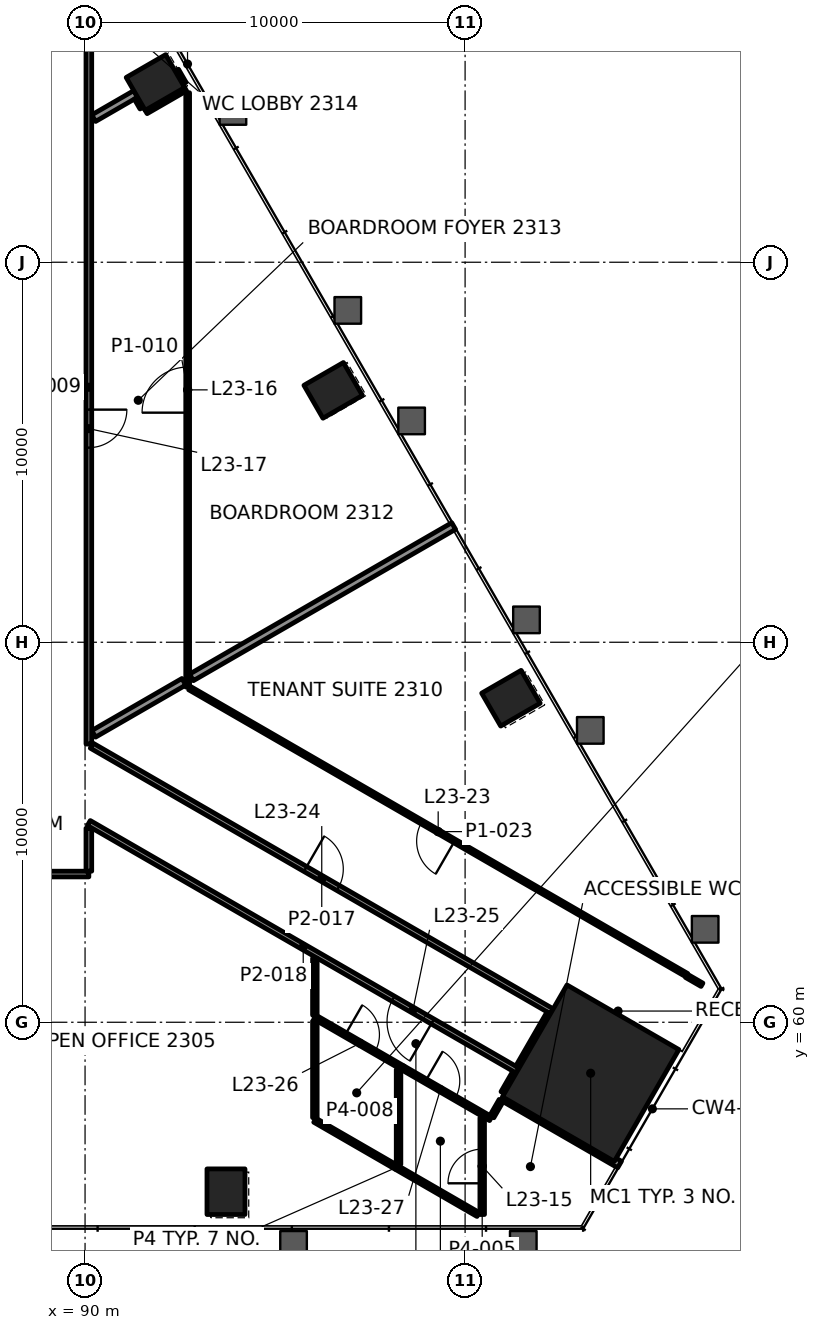
"""IFC4 building model, lengths in metres.
Left out: names, types, materials, properties, quantities, classifications, styles, units other than length and angle.
Written with IfcOpenShell. Run it as: python <this file> out.ifc"""

import sys

from ifc_helpers import new_model, si_unit, direction, frame, frame_2d, origin, origin_2d, place, context, subcontext, project, spatial, rectangle, extrude, element, fill, save


model = new_model("IFC4")
c1 = context("Model", 3, precision=1e-05, world=origin(), true_north=direction((0.0, 1.0)))
c2 = subcontext(c1, "Body", "Model", "MODEL_VIEW")
j1 = project(units=[si_unit("LENGTHUNIT", "METRE"), si_unit("PLANEANGLEUNIT", "RADIAN")], contexts=[c1])
p1 = place(None, origin())
s1 = spatial("IfcSite", under=j1, at=p1, CompositionType="ELEMENT")
p2 = place(p1, origin())
s2 = spatial("IfcBuilding", under=s1, at=p2, CompositionType="ELEMENT")
p3 = place(p2, frame((0.0, 0.0, 103.0)))
s3 = spatial("IfcBuildingStorey", under=s2, at=p3, CompositionType="ELEMENT", Elevation=103.0)
p4 = place(p3, frame((103.304, 58.659, 0.0), z_axis=(0.0, 0.0, 1.0), x_axis=(0.5, 0.866025403784, 0.0)))
e1 = element("IfcColumn", 1, at=p4, inside=s3, PredefinedType="COLUMN", context=c2, shape_type="SweptSolid", body=[
    extrude(rectangle(XDim=3.4, YDim=3.4, at=origin_2d()), origin(), (0.0, 0.0, 1.0), 4.2),
])
for number, where, z_axis, x_axis in (
    (2, (93.708, 55.541, -0.0), (0.0, 0.0, 1.0), (1.0, 0.0, 0.0)),
    (3, (101.206, 68.528, -0.0), (0.0, 0.0, 1.0), (-0.5, 0.866, 0.0)),
    (4, (96.529, 76.628, -0.0), (0.0, 0.0, 1.0), (-0.5, 0.866, 0.0)),
    (5, (91.852, 84.729, -0.0), (0.0, 0.0, 1.0), (-0.5, 0.866, 0.0)),
):
    element("IfcColumn", number, at=place(p3, frame(where, z_axis=z_axis, x_axis=x_axis)), inside=s3, PredefinedType="COLUMN", context=c2, shape_type="SweptSolid", body=[
        extrude(rectangle(XDim=1.0, YDim=1.2, at=origin_2d()), origin(), (0.0, 0.0, 1.0), 4.2),
    ])
p5 = place(p3, frame((90.099, 63.9, 0.0), z_axis=(0.0, 0.0, 1.0), x_axis=(-1.0, 0.0, 0.0)))
e6 = element("IfcWall", 6, at=p5, inside=s3, PredefinedType="PARTITIONING", context=c2, shape_type="SweptSolid", body=[
    extrude(rectangle(XDim=30.199, YDim=0.15, at=frame_2d((15.099, 0.0))), origin(), (0.0, 0.0, 1.0), 3.4),
])
p6 = place(p5, frame((5.882, 0.0, 0.0)))
e7 = element("IfcOpeningElement", 7, at=p6, cuts=e6, PredefinedType="OPENING", context=c2, shape_type="SweptSolid", body=[
    extrude(rectangle(XDim=1.2, YDim=2.1, at=frame_2d((0.6, 1.05))), frame((0.0, 0.085, 0.0), z_axis=(0.0, -1.0, 0.0), x_axis=(1.0, 0.0, 0.0)), (0.0, 0.0, 1.0), 0.17),
])
p7 = place(p5, frame((20.346, 0.0, 0.0)))
e8 = element("IfcOpeningElement", 8, at=p7, cuts=e6, PredefinedType="OPENING", context=c2, shape_type="SweptSolid", body=[
    extrude(rectangle(XDim=1.2, YDim=2.1, at=frame_2d((0.6, 1.05))), frame((0.0, 0.085, 0.0), z_axis=(0.0, -1.0, 0.0), x_axis=(1.0, 0.0, 0.0)), (0.0, 0.0, 1.0), 0.17),
])
p8 = place(p3, frame((90.227, 67.59, 0.0), z_axis=(0.0, 0.0, 1.0), x_axis=(0.866003105128, 0.500038620418, 0.0)))
e9 = element("IfcWall", 9, at=p8, inside=s3, PredefinedType="PARTITIONING", context=c2, shape_type="SweptSolid", body=[
    extrude(rectangle(XDim=2.74, YDim=0.2, at=frame_2d((1.37, 0.0))), origin(), (0.0, 0.0, 1.0), 3.4),
])
p9 = place(p3, frame((91.583, 83.997, 0.0), z_axis=(0.0, 0.0, 1.0), x_axis=(0.866066905393, 0.499928110214, 0.0)))
e10 = element("IfcWall", 10, at=p9, inside=s3, PredefinedType="PARTITIONING", context=c2, shape_type="SweptSolid", body=[
    extrude(rectangle(XDim=1.199, YDim=0.2, at=frame_2d((0.6, 0.0))), origin(), (0.0, 0.0, 1.0), 3.165),
])
p10 = place(p3, frame((90.227, 83.792, 0.0), z_axis=(0.0, 0.0, 1.0), x_axis=(0.866067665301, 0.499926793761, 0.0)))
e11 = element("IfcWall", 11, at=p10, inside=s3, PredefinedType="PARTITIONING", context=c2, shape_type="SweptSolid", body=[
    extrude(rectangle(XDim=1.276, YDim=0.2, at=frame_2d((0.638, 0.0))), origin(), (0.0, 0.0, 1.0), 3.4),
])
p11 = place(p3, frame((100.704, 57.516, 0.0), z_axis=(0.0, 0.0, 1.0), x_axis=(0.499679281737, 0.866210491395, 0.0)))
e12 = element("IfcWall", 12, at=p11, inside=s3, PredefinedType="PARTITIONING", context=c2, shape_type="SweptSolid", body=[
    extrude(rectangle(XDim=0.49, YDim=0.12, at=frame_2d((0.245, 0.0))), origin(), (0.0, 0.0, 1.0), 3.4),
])
p12 = place(p3, frame((101.031, 58.124, 0.0), z_axis=(0.0, 0.0, 1.0), x_axis=(0.500049599607, 0.865996765544, 0.0)))
e13 = element("IfcWall", 13, at=p12, inside=s3, PredefinedType="PARTITIONING", context=c2, shape_type="SweptSolid", body=[
    extrude(rectangle(XDim=0.625, YDim=0.2, at=frame_2d((0.312, 0.0))), origin(), (0.0, 0.0, 1.0), 3.4),
])
p13 = place(p3, frame((100.45, 54.941, 0.0), z_axis=(0.0, 0.0, 1.0), x_axis=(0.0, 1.0, 0.0)))
e14 = element("IfcWall", 14, at=p13, inside=s3, PredefinedType="PARTITIONING", context=c2, shape_type="SweptSolid", body=[
    extrude(rectangle(XDim=2.542, YDim=0.12, at=frame_2d((1.271, 0.0))), origin(), (0.0, 0.0, 1.0), 3.4),
])
p14 = place(p13, frame((0.821, 0.0, 0.0)))
e15 = element("IfcOpeningElement", 15, at=p14, cuts=e14, PredefinedType="OPENING", context=c2, shape_type="SweptSolid", body=[
    extrude(rectangle(XDim=0.9, YDim=2.1, at=frame_2d((0.45, 1.05))), frame((0.0, 0.07, 0.0), z_axis=(0.0, -1.0, 0.0), x_axis=(1.0, 0.0, 0.0)), (0.0, 0.0, 1.0), 0.14),
])
p15 = place(p3, frame((98.249, 56.26, 0.0), z_axis=(0.0, 0.0, 1.0), x_axis=(0.0, 1.0, 0.0)))
e16 = element("IfcWall", 16, at=p15, inside=s3, PredefinedType="PARTITIONING", context=c2, shape_type="SweptSolid", body=[
    extrude(rectangle(XDim=2.495, YDim=0.12, at=frame_2d((1.248, 0.0))), origin(), (0.0, 0.0, 1.0), 3.4),
])
p16 = place(p3, frame((96.047, 57.491, 0.0), z_axis=(0.0, 0.0, 1.0), x_axis=(0.0, 1.0, 0.0)))
e17 = element("IfcWall", 17, at=p16, inside=s3, PredefinedType="PARTITIONING", context=c2, shape_type="SweptSolid", body=[
    extrude(rectangle(XDim=2.541, YDim=0.12, at=frame_2d((1.27, 0.0))), origin(), (0.0, 0.0, 1.0), 3.4),
])
p17 = place(p3, frame((92.7, 68.823, 0.0), z_axis=(0.0, 0.0, 1.0), x_axis=(0.0, 1.0, 0.0)))
e18 = element("IfcWall", 18, at=p17, inside=s3, PredefinedType="PARTITIONING", context=c2, shape_type="SweptSolid", body=[
    extrude(rectangle(XDim=15.638, YDim=0.1, at=frame_2d((7.819, 0.0))), origin(), (0.0, 0.0, 1.0), 3.165),
])
p18 = place(p17, frame((7.219, 0.0, 0.0)))
e19 = element("IfcOpeningElement", 19, at=p18, cuts=e18, PredefinedType="OPENING", context=c2, shape_type="SweptSolid", body=[
    extrude(rectangle(XDim=1.2, YDim=2.1, at=frame_2d((0.6, 1.05))), frame((0.0, 0.06, 0.0), z_axis=(0.0, -1.0, 0.0), x_axis=(1.0, 0.0, 0.0)), (0.0, 0.0, 1.0), 0.12),
])
p19 = place(p3, frame((90.1, 63.976, 0.0), z_axis=(0.0, 0.0, 1.0), x_axis=(0.0, 1.0, 0.0)))
e20 = element("IfcWall", 20, at=p19, inside=s3, PredefinedType="PARTITIONING", context=c2, shape_type="SweptSolid", body=[
    extrude(rectangle(XDim=1.131, YDim=0.15, at=frame_2d((0.565, 0.0))), origin(), (0.0, 0.0, 1.0), 3.247),
])
p20 = place(p3, frame((90.1, 86.1, 0.0), z_axis=(0.0, 0.0, 1.0), x_axis=(0.0, -1.0, 0.0)))
e21 = element("IfcWall", 21, at=p20, inside=s3, PredefinedType="PARTITIONING", context=c2, shape_type="SweptSolid", body=[
    extrude(rectangle(XDim=18.778, YDim=0.15, at=frame_2d((9.389, 0.0))), origin(), (0.0, 0.0, 1.0), 3.4),
])
p21 = place(p20, frame((9.978, 0.0, 0.0)))
e22 = element("IfcOpeningElement", 22, at=p21, cuts=e21, PredefinedType="OPENING", context=c2, shape_type="SweptSolid", body=[
    extrude(rectangle(XDim=1.0, YDim=2.1, at=frame_2d((0.5, 1.05))), frame((0.0, 0.085, 0.0), z_axis=(0.0, -1.0, 0.0), x_axis=(1.0, 0.0, 0.0)), (0.0, 0.0, 1.0), 0.17),
])
p22 = place(p3, frame((92.572, 84.684, 0.0), z_axis=(0.0, 0.0, 1.0), x_axis=(-0.500216468111, 0.865900389786, 0.0)))
e23 = element("IfcWall", 23, at=p22, inside=s3, PredefinedType="PARTITIONING", context=c2, shape_type="SweptSolid", body=[
    extrude(rectangle(XDim=0.399, YDim=0.2, at=frame_2d((0.2, 0.0))), origin(), (0.0, 0.0, 1.0), 3.4),
])
p23 = place(p3, frame((91.532, 84.083, 0.0), z_axis=(0.0, 0.0, 1.0), x_axis=(-0.49965177357, 0.866226359082, 0.0)))
e24 = element("IfcWall", 24, at=p23, inside=s3, PredefinedType="PARTITIONING", context=c2, shape_type="SweptSolid", body=[
    extrude(rectangle(XDim=0.299, YDim=0.2, at=frame_2d((0.149, 0.0))), origin(), (0.0, 0.0, 1.0), 3.4),
])
p24 = place(p3, frame((105.833, 61.24, 0.0), z_axis=(0.0, 0.0, 1.0), x_axis=(-0.866025727262, 0.499999439721, 0.0)))
e25 = element("IfcWall", 25, at=p24, inside=s3, PredefinedType="PARTITIONING", context=c2, shape_type="SweptSolid", body=[
    extrude(rectangle(XDim=15.107, YDim=0.1, at=frame_2d((7.553, 0.0))), origin(), (0.0, 0.0, 1.0), 3.4),
])
p25 = place(p24, frame((7.053, 0.0, 0.0)))
e26 = element("IfcOpeningElement", 26, at=p25, cuts=e25, PredefinedType="OPENING", context=c2, shape_type="SweptSolid", body=[
    extrude(rectangle(XDim=1.0, YDim=2.1, at=frame_2d((0.5, 1.05))), frame((0.0, 0.06, 0.0), z_axis=(0.0, -1.0, 0.0), x_axis=(1.0, 0.0, 0.0)), (0.0, 0.0, 1.0), 0.12),
])
p26 = place(p3, frame((106.233, 60.986, 0.0), z_axis=(0.0, 0.0, 1.0), x_axis=(-0.866073792734, 0.499916178513, 0.0)))
e27 = element("IfcWall", 27, at=p26, inside=s3, PredefinedType="PARTITIONING", context=c2, shape_type="SweptSolid", body=[
    extrude(rectangle(XDim=0.473, YDim=0.1, at=frame_2d((0.236, 0.0))), origin(), (0.0, 0.0, 1.0), 3.4),
])
p27 = place(p3, frame((90.175, 67.278, 0.0), z_axis=(0.0, 0.0, 1.0), x_axis=(0.866025916507, -0.499999111938, 0.0)))
e28 = element("IfcWall", 28, at=p27, inside=s3, PredefinedType="PARTITIONING", context=c2, shape_type="SweptSolid", body=[
    extrude(rectangle(XDim=13.979, YDim=0.15, at=frame_2d((6.99, 0.0))), origin(), (0.0, 0.0, 1.0), 3.4),
])
p28 = place(p27, frame((6.49, 0.0, 0.0)))
e29 = element("IfcOpeningElement", 29, at=p28, cuts=e28, PredefinedType="OPENING", context=c2, shape_type="SweptSolid", body=[
    extrude(rectangle(XDim=1.0, YDim=2.1, at=frame_2d((0.5, 1.05))), frame((0.0, 0.085, 0.0), z_axis=(0.0, -1.0, 0.0), x_axis=(1.0, 0.0, 0.0)), (0.0, 0.0, 1.0), 0.17),
])
p29 = place(p3, frame((101.382, 58.729, 0.0), z_axis=(0.0, 0.0, 1.0), x_axis=(-0.866023606965, 0.500003112169, 0.0)))
e30 = element("IfcWall", 30, at=p29, inside=s3, PredefinedType="PARTITIONING", context=c2, shape_type="SweptSolid", body=[
    extrude(rectangle(XDim=13.027, YDim=0.15, at=frame_2d((6.513, 0.0))), origin(), (0.0, 0.0, 1.0), 3.247),
])
p30 = place(p29, frame((2.581, 0.0, 0.0)))
e31 = element("IfcOpeningElement", 31, at=p30, cuts=e30, PredefinedType="OPENING", context=c2, shape_type="SweptSolid", body=[
    extrude(rectangle(XDim=1.2, YDim=2.1, at=frame_2d((0.6, 1.05))), frame((0.0, 0.085, 0.0), z_axis=(0.0, -1.0, 0.0), x_axis=(1.0, 0.0, 0.0)), (0.0, 0.0, 1.0), 0.17),
])
p31 = place(p3, frame((104.065, 56.257, 0.0), z_axis=(0.0, 0.0, 1.0), x_axis=(-0.866034141321, 0.499984865837, 0.0)))
e32 = element("IfcWall", 32, at=p31, inside=s3, PredefinedType="PARTITIONING", context=c2, shape_type="SweptSolid", body=[
    extrude(rectangle(XDim=3.543, YDim=0.2, at=frame_2d((1.772, 0.0))), origin(), (0.0, 0.0, 1.0), 3.4),
])
p32 = place(p3, frame((96.047, 60.135, 0.0), z_axis=(0.0, 0.0, 1.0), x_axis=(0.866018138487, -0.500012583653, 0.0)))
e33 = element("IfcWall", 33, at=p32, inside=s3, PredefinedType="PARTITIONING", context=c2, shape_type="SweptSolid", body=[
    extrude(rectangle(XDim=5.342, YDim=0.12, at=frame_2d((2.671, 0.0))), origin(), (0.0, 0.0, 1.0), 3.4),
])
p33 = place(p32, frame((0.923, 0.0, 0.0)))
e34 = element("IfcOpeningElement", 34, at=p33, cuts=e33, PredefinedType="OPENING", context=c2, shape_type="SweptSolid", body=[
    extrude(rectangle(XDim=0.9, YDim=2.1, at=frame_2d((0.45, 1.05))), frame((0.0, 0.07, 0.0), z_axis=(0.0, -1.0, 0.0), x_axis=(1.0, 0.0, 0.0)), (0.0, 0.0, 1.0), 0.14),
])
p34 = place(p32, frame((3.364, 0.0, 0.0)))
e35 = element("IfcOpeningElement", 35, at=p34, cuts=e33, PredefinedType="OPENING", context=c2, shape_type="SweptSolid", body=[
    extrude(rectangle(XDim=0.9, YDim=2.1, at=frame_2d((0.45, 1.05))), frame((0.0, 0.07, 0.0), z_axis=(0.0, -1.0, 0.0), x_axis=(1.0, 0.0, 0.0)), (0.0, 0.0, 1.0), 0.14),
])
p35 = place(p3, frame((100.343, 54.941, 0.0), z_axis=(0.0, 0.0, 1.0), x_axis=(-0.866005271205, 0.500034869029, 0.0)))
e36 = element("IfcWall", 36, at=p35, inside=s3, PredefinedType="PARTITIONING", context=c2, shape_type="SweptSolid", body=[
    extrude(rectangle(XDim=4.961, YDim=0.12, at=frame_2d((2.48, 0.0))), origin(), (0.0, 0.0, 1.0), 3.4),
])
p36 = place(p3, frame((92.8, 69.075, 0.0), z_axis=(0.0, 0.0, 1.0), x_axis=(0.866027879581, 0.49999571177, 0.0)))
e37 = element("IfcWall", 37, at=p36, inside=s3, PredefinedType="PARTITIONING", context=c2, shape_type="SweptSolid", body=[
    extrude(rectangle(XDim=7.966, YDim=0.2, at=frame_2d((3.983, 0.0))), origin(), (0.0, 0.0, 1.0), 3.165),
])
p37 = place(p3, frame((101.419, 58.795, 0.0), z_axis=(0.0, 0.0, 1.0), x_axis=(0.499944585209, 0.866057395165, 0.0)))
e38 = element("IfcWall", 38, at=p37, inside=s3, PredefinedType="PARTITIONING", context=c2, shape_type="SweptSolid", body=[
    extrude(rectangle(XDim=1.649, YDim=0.2, at=frame_2d((0.825, 0.0))), origin(), (0.0, 0.0, 1.0), 3.247),
])
p38 = place(p3, frame((96.047, 60.187, 0.0), z_axis=(0.0, 0.0, 1.0), x_axis=(0.0, 1.0, 0.0)))
e39 = element("IfcWall", 39, at=p38, inside=s3, PredefinedType="PARTITIONING", context=c2, shape_type="SweptSolid", body=[
    extrude(rectangle(XDim=1.496, YDim=0.12, at=frame_2d((0.748, 0.0))), origin(), (0.0, 0.0, 1.0), 3.4),
])
p39 = place(p14, origin())
e40 = element("IfcDoor", 40, at=p39, inside=s3, OperationType="SINGLE_SWING_RIGHT", PredefinedType="DOOR", context=c2, shape_type="SweptSolid", body=[
    extrude(rectangle(XDim=0.9, YDim=2.1, at=frame_2d((0.45, 1.05))), frame((0.0, 0.025, 0.0), z_axis=(0.0, -1.0, 0.0), x_axis=(1.0, 0.0, 0.0)), (0.0, 0.0, 1.0), 0.05),
])
fill(e15, e40)
p40 = place(p18, origin())
e41 = element("IfcDoor", 41, at=p40, inside=s3, OperationType="DOUBLE_DOOR_SINGLE_SWING", PredefinedType="DOOR", context=c2, shape_type="SweptSolid", body=[
    extrude(rectangle(XDim=1.2, YDim=2.1, at=frame_2d((0.6, 1.05))), frame((0.0, 0.025, 0.0), z_axis=(0.0, -1.0, 0.0), x_axis=(1.0, 0.0, 0.0)), (0.0, 0.0, 1.0), 0.05),
])
fill(e19, e41)
p41 = place(p21, origin())
e42 = element("IfcDoor", 42, at=p41, inside=s3, OperationType="SINGLE_SWING_LEFT", PredefinedType="DOOR", context=c2, shape_type="SweptSolid", body=[
    extrude(rectangle(XDim=1.0, YDim=2.1, at=frame_2d((0.5, 1.05))), frame((0.0, 0.025, 0.0), z_axis=(0.0, -1.0, 0.0), x_axis=(1.0, 0.0, 0.0)), (0.0, 0.0, 1.0), 0.05),
])
fill(e22, e42)
p42 = place(p25, origin())
e43 = element("IfcDoor", 43, at=p42, inside=s3, OperationType="SINGLE_SWING_LEFT", PredefinedType="DOOR", context=c2, shape_type="SweptSolid", body=[
    extrude(rectangle(XDim=1.0, YDim=2.1, at=frame_2d((0.5, 1.05))), frame((0.0, 0.025, 0.0), z_axis=(0.0, -1.0, 0.0), x_axis=(1.0, 0.0, 0.0)), (0.0, 0.0, 1.0), 0.05),
])
fill(e26, e43)
p43 = place(p28, origin())
e44 = element("IfcDoor", 44, at=p43, inside=s3, OperationType="SINGLE_SWING_LEFT", PredefinedType="DOOR", context=c2, shape_type="SweptSolid", body=[
    extrude(rectangle(XDim=1.0, YDim=2.1, at=frame_2d((0.5, 1.05))), frame((0.0, 0.025, 0.0), z_axis=(0.0, -1.0, 0.0), x_axis=(1.0, 0.0, 0.0)), (0.0, 0.0, 1.0), 0.05),
])
fill(e29, e44)
p44 = place(p30, origin())
e45 = element("IfcDoor", 45, at=p44, inside=s3, OperationType="DOUBLE_DOOR_SINGLE_SWING", PredefinedType="DOOR", context=c2, shape_type="SweptSolid", body=[
    extrude(rectangle(XDim=1.2, YDim=2.1, at=frame_2d((0.6, 1.05))), frame((0.0, 0.025, 0.0), z_axis=(0.0, -1.0, 0.0), x_axis=(1.0, 0.0, 0.0)), (0.0, 0.0, 1.0), 0.05),
])
fill(e31, e45)
p45 = place(p33, origin())
e46 = element("IfcDoor", 46, at=p45, inside=s3, OperationType="SINGLE_SWING_LEFT", PredefinedType="DOOR", context=c2, shape_type="SweptSolid", body=[
    extrude(rectangle(XDim=0.9, YDim=2.1, at=frame_2d((0.45, 1.05))), frame((0.0, 0.025, 0.0), z_axis=(0.0, -1.0, 0.0), x_axis=(1.0, 0.0, 0.0)), (0.0, 0.0, 1.0), 0.05),
])
fill(e34, e46)
p46 = place(p34, origin())
e47 = element("IfcDoor", 47, at=p46, inside=s3, OperationType="SINGLE_SWING_RIGHT", PredefinedType="DOOR", context=c2, shape_type="SweptSolid", body=[
    extrude(rectangle(XDim=0.9, YDim=2.1, at=frame_2d((0.45, 1.05))), frame((0.0, 0.025, 0.0), z_axis=(0.0, -1.0, 0.0), x_axis=(1.0, 0.0, 0.0)), (0.0, 0.0, 1.0), 0.05),
])
fill(e35, e47)
save(model, sys.argv[1])
